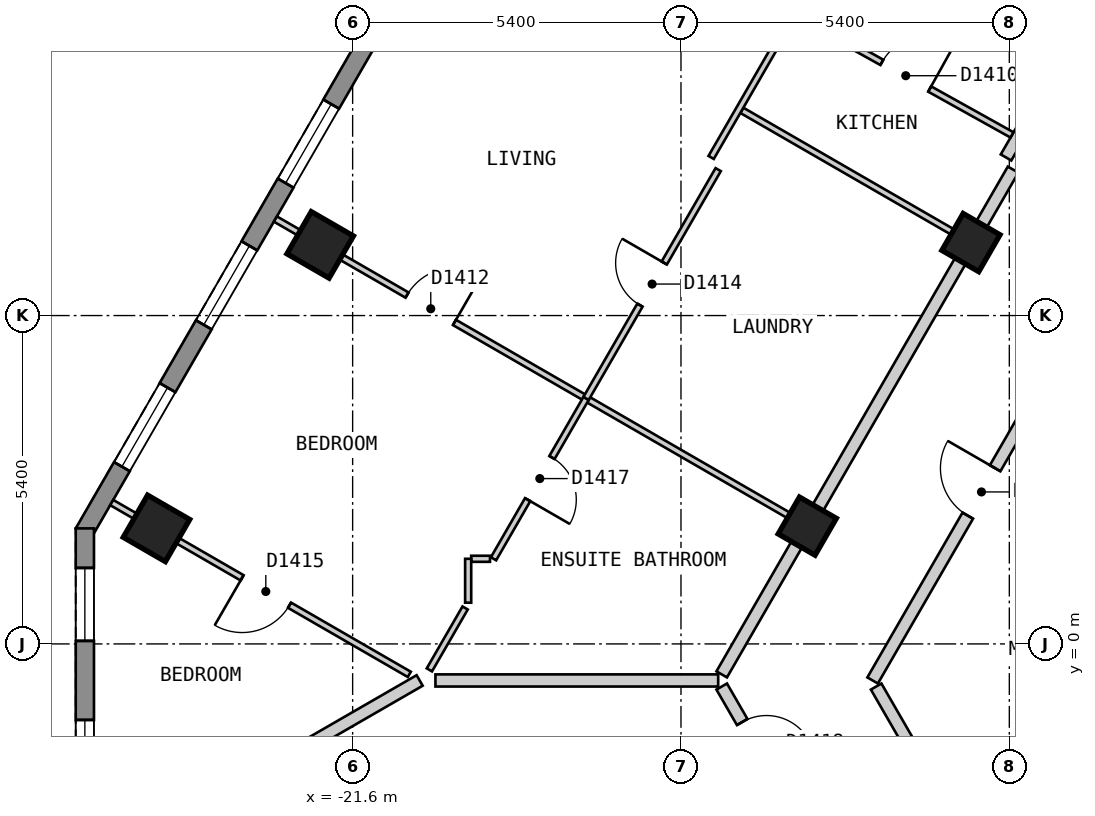
"""IFC4 building model, lengths in metres.
Left out: names, types, materials, properties, quantities, classifications, styles, units other than length and angle.
Written with IfcOpenShell. Run it as: python <this file> out.ifc"""

import sys

from ifc_helpers import new_model, si_unit, direction, frame, frame_2d, origin, origin_2d, place, context, subcontext, project, spatial, polyline, rectangle, outline, extrude, element, fill, save


model = new_model("IFC4")
c1 = context("Model", 3, precision=1e-05, world=origin(), true_north=direction((0.0, 1.0)))
c2 = subcontext(c1, "Body", "Model", "MODEL_VIEW")
j1 = project(units=[si_unit("LENGTHUNIT", "METRE"), si_unit("PLANEANGLEUNIT", "RADIAN")], contexts=[c1])
p1 = place(None, origin())
s1 = spatial("IfcSite", under=j1, at=p1, CompositionType="ELEMENT")
p2 = place(p1, origin())
s2 = spatial("IfcBuilding", under=s1, at=p2, CompositionType="ELEMENT")
p3 = place(p2, frame((0.0, 0.0, 166.2)))
s3 = spatial("IfcBuildingStorey", under=s2, at=p3, CompositionType="ELEMENT", Elevation=166.2)
for number, where, z_axis, x_axis in (
    (1, (-22.134, 6.562, 0.0), (0.0, 0.0, 1.0), (-0.5, -0.866, 0.0)),
    (2, (-24.826, 1.9, 0.0), (0.0, 0.0, 1.0), (-0.5, -0.866, 0.0)),
):
    element("IfcColumn", number, at=place(p3, frame(where, z_axis=z_axis, x_axis=x_axis)), inside=s3, PredefinedType="COLUMN", context=c2, shape_type="SweptSolid", body=[
        extrude(rectangle(XDim=0.8, YDim=0.8, at=origin_2d()), origin(), (0.0, 0.0, 1.0), 3.0),
    ])
for number, where, z_axis, x_axis in (
    (3, (-11.431, 6.6, 0.0), (0.0, 0.0, 1.0), (-0.5, -0.866, 0.0)),
    (4, (-14.123, 1.937, 0.0), (0.0, 0.0, 1.0), (-0.5, -0.866, 0.0)),
):
    element("IfcColumn", number, at=place(p3, frame(where, z_axis=z_axis, x_axis=x_axis)), inside=s3, PredefinedType="COLUMN", context=c2, shape_type="SweptSolid", body=[
        extrude(rectangle(XDim=0.7, YDim=0.7, at=origin_2d()), origin(), (0.0, 0.0, 1.0), 3.0),
    ])
p4 = place(p3, frame((-14.592, 21.625, 0.0), z_axis=(0.0, 0.0, 1.0), x_axis=(-0.500010537973, -0.866019319597, 0.0)))
e5 = element("IfcWall", 5, at=p4, inside=s3, PredefinedType="SOLIDWALL", context=c2, shape_type="SweptSolid", body=[
    extrude(outline(polyline([(0.0, -0.15), (22.863, -0.15), (22.783, 0.15), (0.08, 0.15), (0.0, -0.15)])), origin(), (0.0, 0.0, 1.0), 2.7),
])
p5 = place(p4, frame((1.259, 0.0, 0.15)))
e6 = element("IfcOpeningElement", 6, at=p5, cuts=e5, PredefinedType="OPENING", context=c2, shape_type="SweptSolid", body=[
    extrude(rectangle(XDim=1.5, YDim=2.1, at=frame_2d((0.75, 1.05))), frame((0.0, 0.16, 0.0), z_axis=(0.0, -1.0, 0.0), x_axis=(1.0, 0.0, 0.0)), (0.0, 0.0, 1.0), 0.32),
])
p6 = place(p4, frame((3.952, 0.0, 0.15)))
e7 = element("IfcOpeningElement", 7, at=p6, cuts=e5, PredefinedType="OPENING", context=c2, shape_type="SweptSolid", body=[
    extrude(rectangle(XDim=1.5, YDim=2.1, at=frame_2d((0.75, 1.05))), frame((0.0, 0.16, 0.0), z_axis=(0.0, -1.0, 0.0), x_axis=(1.0, 0.0, 0.0)), (0.0, 0.0, 1.0), 0.32),
])
p7 = place(p4, frame((6.644, 0.0, 0.15)))
e8 = element("IfcOpeningElement", 8, at=p7, cuts=e5, PredefinedType="OPENING", context=c2, shape_type="SweptSolid", body=[
    extrude(rectangle(XDim=1.5, YDim=2.1, at=frame_2d((0.75, 1.05))), frame((0.0, 0.16, 0.0), z_axis=(0.0, -1.0, 0.0), x_axis=(1.0, 0.0, 0.0)), (0.0, 0.0, 1.0), 0.32),
])
p8 = place(p4, frame((9.335, 0.0, 0.15)))
e9 = element("IfcOpeningElement", 9, at=p8, cuts=e5, PredefinedType="OPENING", context=c2, shape_type="SweptSolid", body=[
    extrude(rectangle(XDim=1.5, YDim=2.1, at=frame_2d((0.75, 1.05))), frame((0.0, 0.16, 0.0), z_axis=(0.0, -1.0, 0.0), x_axis=(1.0, 0.0, 0.0)), (0.0, 0.0, 1.0), 0.32),
])
p9 = place(p4, frame((12.028, 0.0, 0.15)))
e10 = element("IfcOpeningElement", 10, at=p9, cuts=e5, PredefinedType="OPENING", context=c2, shape_type="SweptSolid", body=[
    extrude(rectangle(XDim=1.5, YDim=2.1, at=frame_2d((0.75, 1.05))), frame((0.0, 0.16, 0.0), z_axis=(0.0, -1.0, 0.0), x_axis=(1.0, 0.0, 0.0)), (0.0, 0.0, 1.0), 0.32),
])
p10 = place(p4, frame((14.72, 0.0, 0.15)))
e11 = element("IfcOpeningElement", 11, at=p10, cuts=e5, PredefinedType="OPENING", context=c2, shape_type="SweptSolid", body=[
    extrude(rectangle(XDim=1.5, YDim=2.1, at=frame_2d((0.75, 1.05))), frame((0.0, 0.16, 0.0), z_axis=(0.0, -1.0, 0.0), x_axis=(1.0, 0.0, 0.0)), (0.0, 0.0, 1.0), 0.32),
])
p11 = place(p4, frame((17.411, 0.0, 0.15)))
e12 = element("IfcOpeningElement", 12, at=p11, cuts=e5, PredefinedType="OPENING", context=c2, shape_type="SweptSolid", body=[
    extrude(rectangle(XDim=1.5, YDim=2.1, at=frame_2d((0.75, 1.05))), frame((0.0, 0.16, 0.0), z_axis=(0.0, -1.0, 0.0), x_axis=(1.0, 0.0, 0.0)), (0.0, 0.0, 1.0), 0.32),
])
p12 = place(p4, frame((20.104, 0.0, 0.15)))
e13 = element("IfcOpeningElement", 13, at=p12, cuts=e5, PredefinedType="OPENING", context=c2, shape_type="SweptSolid", body=[
    extrude(rectangle(XDim=1.5, YDim=2.1, at=frame_2d((0.75, 1.05))), frame((0.0, 0.16, 0.0), z_axis=(0.0, -1.0, 0.0), x_axis=(1.0, 0.0, 0.0)), (0.0, 0.0, 1.0), 0.32),
])
p13 = place(p3, frame((-26.004, 1.9, 0.0), z_axis=(0.0, 0.0, 1.0), x_axis=(0.0, -1.0, 0.0)))
e14 = element("IfcWall", 14, at=p13, inside=s3, PredefinedType="SOLIDWALL", context=c2, shape_type="SweptSolid", body=[
    extrude(outline(polyline([(0.0, -0.15), (5.0, -0.15), (4.92, 0.15), (0.08, 0.15), (0.0, -0.15)])), origin(), (0.0, 0.0, 1.0), 2.7),
])
p14 = place(p13, frame((0.65, 0.0, 0.15)))
e15 = element("IfcOpeningElement", 15, at=p14, cuts=e14, PredefinedType="OPENING", context=c2, shape_type="SweptSolid", body=[
    extrude(rectangle(XDim=1.2, YDim=2.1, at=frame_2d((0.6, 1.05))), frame((0.0, 0.16, 0.0), z_axis=(0.0, -1.0, 0.0), x_axis=(1.0, 0.0, 0.0)), (0.0, 0.0, 1.0), 0.32),
])
p15 = place(p13, frame((3.15, 0.0, 0.15)))
e16 = element("IfcOpeningElement", 16, at=p15, cuts=e14, PredefinedType="OPENING", context=c2, shape_type="SweptSolid", body=[
    extrude(rectangle(XDim=1.2, YDim=2.1, at=frame_2d((0.6, 1.05))), frame((0.0, 0.16, 0.0), z_axis=(0.0, -1.0, 0.0), x_axis=(1.0, 0.0, 0.0)), (0.0, 0.0, 1.0), 0.32),
])
p16 = place(p3, frame((-12.99, -0.701, 0.0), z_axis=(0.0, 0.0, 1.0), x_axis=(0.499972710878, -0.866041158593, 0.0)))
e17 = element("IfcWall", 17, at=p16, inside=s3, PredefinedType="PARTITIONING", context=c2, shape_type="SweptSolid", body=[
    extrude(rectangle(XDim=2.308, YDim=0.2, at=frame_2d((1.154, 0.0))), origin(), (0.0, 0.0, 1.0), 2.7),
])
p17 = place(p3, frame((-15.53, -0.701, 0.0), z_axis=(0.0, 0.0, 1.0), x_axis=(0.499972710878, -0.866041158593, 0.0)))
e18 = element("IfcWall", 18, at=p17, inside=s3, PredefinedType="PARTITIONING", context=c2, shape_type="SweptSolid", body=[
    extrude(rectangle(XDim=2.308, YDim=0.2, at=frame_2d((1.154, 0.0))), origin(), (0.0, 0.0, 1.0), 2.7),
])
p18 = place(p17, frame((0.674, 0.0, 0.0)))
e19 = element("IfcOpeningElement", 19, at=p18, cuts=e18, PredefinedType="OPENING", context=c2, shape_type="SweptSolid", body=[
    extrude(rectangle(XDim=0.8, YDim=2.1, at=frame_2d((0.4, 1.05))), frame((0.0, 0.11, 0.0), z_axis=(0.0, -1.0, 0.0), x_axis=(1.0, 0.0, 0.0)), (0.0, 0.0, 1.0), 0.22),
])
p19 = place(p3, frame((-13.048, -0.601, 0.0), z_axis=(0.0, 0.0, 1.0), x_axis=(0.499982180423, 0.866035691677, 0.0)))
e20 = element("IfcWall", 20, at=p19, inside=s3, PredefinedType="PARTITIONING", context=c2, shape_type="SweptSolid", body=[
    extrude(rectangle(XDim=7.16, YDim=0.2, at=frame_2d((3.58, 0.0))), origin(), (0.0, 0.0, 1.0), 2.7),
])
p20 = place(p19, frame((3.13, 0.0, 0.0)))
e21 = element("IfcOpeningElement", 21, at=p20, cuts=e20, PredefinedType="OPENING", context=c2, shape_type="SweptSolid", body=[
    extrude(rectangle(XDim=0.9, YDim=2.1, at=frame_2d((0.45, 1.05))), frame((0.0, 0.11, 0.0), z_axis=(0.0, -1.0, 0.0), x_axis=(1.0, 0.0, 0.0)), (0.0, 0.0, 1.0), 0.22),
])
p21 = place(p3, frame((-15.53, -0.501, 0.0), z_axis=(0.0, 0.0, 1.0), x_axis=(0.499952498232, 0.866052827206, 0.0)))
e22 = element("IfcWall", 22, at=p21, inside=s3, PredefinedType="PARTITIONING", context=c2, shape_type="SweptSolid", body=[
    extrude(rectangle(XDim=9.585, YDim=0.2, at=frame_2d((4.792, 0.0))), origin(), (0.0, 0.0, 1.0), 2.7),
])
p22 = place(p3, frame((-10.854, 8.0, 0.0), z_axis=(0.0, 0.0, 1.0), x_axis=(0.499997637144, 0.866026767976, 0.0)))
e23 = element("IfcWall", 23, at=p22, inside=s3, PredefinedType="PARTITIONING", context=c2, shape_type="SweptSolid", body=[
    extrude(rectangle(XDim=10.854, YDim=0.2, at=frame_2d((5.427, 0.0))), origin(), (0.0, 0.0, 1.0), 2.7),
])
p23 = place(p22, frame((0.721, 0.0, 0.0)))
e24 = element("IfcOpeningElement", 24, at=p23, cuts=e23, PredefinedType="OPENING", context=c2, shape_type="SweptSolid", body=[
    extrude(rectangle(XDim=1.0, YDim=2.1, at=frame_2d((0.5, 1.05))), frame((0.0, 0.11, 0.0), z_axis=(0.0, -1.0, 0.0), x_axis=(1.0, 0.0, 0.0)), (0.0, 0.0, 1.0), 0.22),
])
p24 = place(p3, frame((-14.294, 10.342, 0.0), z_axis=(0.0, 0.0, 1.0), x_axis=(0.873582256032, -0.486676527013, 0.0)))
e25 = element("IfcWall", 25, at=p24, inside=s3, PredefinedType="PARTITIONING", context=c2, shape_type="SweptSolid", body=[
    extrude(rectangle(XDim=4.05, YDim=0.1, at=frame_2d((2.025, 0.0))), origin(), (0.0, 0.0, 1.0), 2.7),
])
p25 = place(p24, frame((1.6, 0.0, 0.0)))
e26 = element("IfcOpeningElement", 26, at=p25, cuts=e25, PredefinedType="OPENING", context=c2, shape_type="SweptSolid", body=[
    extrude(rectangle(XDim=0.9, YDim=2.1, at=frame_2d((0.45, 1.05))), frame((0.0, 0.06, 0.0), z_axis=(0.0, -1.0, 0.0), x_axis=(1.0, 0.0, 0.0)), (0.0, 0.0, 1.0), 0.12),
])
p26 = place(p3, frame((-22.87, 6.987, 0.0), z_axis=(0.0, 0.0, 1.0), x_axis=(0.866022959057, -0.500004234368, 0.0)))
e27 = element("IfcWall", 27, at=p26, inside=s3, PredefinedType="PARTITIONING", context=c2, shape_type="SweptSolid", body=[
    extrude(rectangle(XDim=10.0, YDim=0.1, at=frame_2d((5.0, 0.0))), origin(), (0.0, 0.0, 1.0), 2.7),
])
p27 = place(p26, frame((2.5, 0.0, 0.0)))
e28 = element("IfcOpeningElement", 28, at=p27, cuts=e27, PredefinedType="OPENING", context=c2, shape_type="SweptSolid", body=[
    extrude(rectangle(XDim=0.9, YDim=2.1, at=frame_2d((0.45, 1.05))), frame((0.0, 0.06, 0.0), z_axis=(0.0, -1.0, 0.0), x_axis=(1.0, 0.0, 0.0)), (0.0, 0.0, 1.0), 0.12),
])
p28 = place(p3, frame((-25.562, 2.325, 0.0), z_axis=(0.0, 0.0, 1.0), x_axis=(0.865998530728, -0.500046542611, 0.0)))
e29 = element("IfcWall", 29, at=p28, inside=s3, PredefinedType="PARTITIONING", context=c2, shape_type="SweptSolid", body=[
    extrude(rectangle(XDim=5.651, YDim=0.1, at=frame_2d((2.826, 0.0))), origin(), (0.0, 0.0, 1.0), 2.7),
])
p29 = place(p28, frame((2.476, 0.0, 0.0)))
e30 = element("IfcOpeningElement", 30, at=p29, cuts=e29, PredefinedType="OPENING", context=c2, shape_type="SweptSolid", body=[
    extrude(rectangle(XDim=0.9, YDim=2.1, at=frame_2d((0.45, 1.05))), frame((0.0, 0.06, 0.0), z_axis=(0.0, -1.0, 0.0), x_axis=(1.0, 0.0, 0.0)), (0.0, 0.0, 1.0), 0.12),
])
p30 = place(p3, frame((-15.199, 8.775, 0.0), z_axis=(0.0, 0.0, 1.0), x_axis=(0.866043063166, -0.499969411806, 0.0)))
e31 = element("IfcWall", 31, at=p30, inside=s3, PredefinedType="PARTITIONING", context=c2, shape_type="SweptSolid", body=[
    extrude(rectangle(XDim=4.25, YDim=0.1, at=frame_2d((2.125, 0.0))), origin(), (0.0, 0.0, 1.0), 2.7),
])
p31 = place(p3, frame((-19.65, 1.4, 0.0), z_axis=(0.0, 0.0, 1.0), x_axis=(1.0, 0.0, 0.0)))
e32 = element("IfcWall", 32, at=p31, inside=s3, PredefinedType="PARTITIONING", context=c2, shape_type="SweptSolid", body=[
    extrude(rectangle(XDim=0.309, YDim=0.1, at=frame_2d((0.154, 0.0))), origin(), (0.0, 0.0, 1.0), 2.7),
])
p32 = place(p3, frame((-20.338, -0.427, 0.0), z_axis=(0.0, 0.0, 1.0), x_axis=(0.500069990121, 0.865984991198, 0.0)))
e33 = element("IfcWall", 33, at=p32, inside=s3, PredefinedType="PARTITIONING", context=c2, shape_type="SweptSolid", body=[
    extrude(rectangle(XDim=1.176, YDim=0.1, at=frame_2d((0.588, 0.0))), origin(), (0.0, 0.0, 1.0), 2.7),
])
p33 = place(p3, frame((-19.283, 1.4, 0.0), z_axis=(0.0, 0.0, 1.0), x_axis=(0.499847391584, 0.866113494368, 0.0)))
e34 = element("IfcWall", 34, at=p33, inside=s3, PredefinedType="PARTITIONING", context=c2, shape_type="SweptSolid", body=[
    extrude(rectangle(XDim=3.045, YDim=0.1, at=frame_2d((1.522, 0.0))), origin(), (0.0, 0.0, 1.0), 2.7),
])
p34 = place(p33, frame((1.123, 0.0, 0.0)))
e35 = element("IfcOpeningElement", 35, at=p34, cuts=e34, PredefinedType="OPENING", context=c2, shape_type="SweptSolid", body=[
    extrude(rectangle(XDim=0.8, YDim=2.1, at=frame_2d((0.4, 1.05))), frame((0.0, 0.06, 0.0), z_axis=(0.0, -1.0, 0.0), x_axis=(1.0, 0.0, 0.0)), (0.0, 0.0, 1.0), 0.12),
])
p35 = place(p3, frame((-15.704, 8.0, 0.0), z_axis=(0.0, 0.0, 1.0), x_axis=(0.500005637941, 0.866022148693, 0.0)))
e36 = element("IfcWall", 36, at=p35, inside=s3, PredefinedType="PARTITIONING", context=c2, shape_type="SweptSolid", body=[
    extrude(rectangle(XDim=11.592, YDim=0.1, at=frame_2d((5.796, 0.0))), origin(), (0.0, 0.0, 1.0), 2.7),
])
p36 = place(p35, frame((3.132, 0.0, 0.0)))
e37 = element("IfcOpeningElement", 37, at=p36, cuts=e36, PredefinedType="OPENING", context=c2, shape_type="SweptSolid", body=[
    extrude(rectangle(XDim=0.9, YDim=2.1, at=frame_2d((0.45, 1.05))), frame((0.0, 0.06, 0.0), z_axis=(0.0, -1.0, 0.0), x_axis=(1.0, 0.0, 0.0)), (0.0, 0.0, 1.0), 0.12),
])
p37 = place(p35, frame((8.6, 0.0, 0.0)))
e38 = element("IfcOpeningElement", 38, at=p37, cuts=e36, PredefinedType="OPENING", context=c2, shape_type="SweptSolid", body=[
    extrude(rectangle(XDim=0.8, YDim=2.1, at=frame_2d((0.4, 1.05))), frame((0.0, 0.06, 0.0), z_axis=(0.0, -1.0, 0.0), x_axis=(1.0, 0.0, 0.0)), (0.0, 0.0, 1.0), 0.12),
])
p38 = place(p3, frame((-19.7, 0.678, 0.0), z_axis=(0.0, 0.0, 1.0), x_axis=(0.0, 1.0, 0.0)))
e39 = element("IfcWall", 39, at=p38, inside=s3, PredefinedType="PARTITIONING", context=c2, shape_type="SweptSolid", body=[
    extrude(rectangle(XDim=0.722, YDim=0.1, at=frame_2d((0.361, 0.0))), origin(), (0.0, 0.0, 1.0), 2.7),
])
p39 = place(p3, frame((-20.238, -0.601, 0.0), z_axis=(0.0, 0.0, 1.0), x_axis=(1.0, 0.0, 0.0)))
e40 = element("IfcWall", 40, at=p39, inside=s3, PredefinedType="PARTITIONING", context=c2, shape_type="SweptSolid", body=[
    extrude(rectangle(XDim=4.65, YDim=0.2, at=frame_2d((2.325, 0.0))), origin(), (0.0, 0.0, 1.0), 2.7),
])
p40 = place(p3, frame((-25.563, -3.524, 0.0), z_axis=(0.0, 0.0, 1.0), x_axis=(0.866128586522, 0.499821239653, 0.0)))
e41 = element("IfcWall", 41, at=p40, inside=s3, PredefinedType="PARTITIONING", context=c2, shape_type="SweptSolid", body=[
    extrude(rectangle(XDim=5.848, YDim=0.2, at=frame_2d((2.924, 0.0))), origin(), (0.0, 0.0, 1.0), 2.7),
])
p41 = place(p3, frame((-17.761, 4.037, 0.0), z_axis=(0.0, 0.0, 1.0), x_axis=(0.50009692756, 0.865969435399, 0.0)))
e42 = element("IfcWall", 42, at=p41, inside=s3, PredefinedType="PARTITIONING", context=c2, shape_type="SweptSolid", body=[
    extrude(rectangle(XDim=4.345, YDim=0.1, at=frame_2d((2.173, 0.0))), origin(), (0.0, 0.0, 1.0), 2.7),
])
p42 = place(p41, frame((1.772, 0.0, 0.0)))
e43 = element("IfcOpeningElement", 43, at=p42, cuts=e42, PredefinedType="OPENING", context=c2, shape_type="SweptSolid", body=[
    extrude(rectangle(XDim=0.8, YDim=2.1, at=frame_2d((0.4, 1.05))), frame((0.0, 0.06, 0.0), z_axis=(0.0, -1.0, 0.0), x_axis=(1.0, 0.0, 0.0)), (0.0, 0.0, 1.0), 0.12),
])
p43 = place(p10, origin())
e44 = element("IfcWindow", 44, at=p43, inside=s3, PartitioningType="SINGLE_PANEL", PredefinedType="WINDOW", context=c2, shape_type="SweptSolid", body=[
    extrude(rectangle(XDim=1.5, YDim=2.1, at=frame_2d((0.75, 1.05))), frame((0.0, 0.03, 0.0), z_axis=(0.0, -1.0, 0.0), x_axis=(1.0, 0.0, 0.0)), (0.0, 0.0, 1.0), 0.06),
])
fill(e11, e44)
p44 = place(p11, origin())
e45 = element("IfcWindow", 45, at=p44, inside=s3, PartitioningType="SINGLE_PANEL", PredefinedType="WINDOW", context=c2, shape_type="SweptSolid", body=[
    extrude(rectangle(XDim=1.5, YDim=2.1, at=frame_2d((0.75, 1.05))), frame((0.0, 0.03, 0.0), z_axis=(0.0, -1.0, 0.0), x_axis=(1.0, 0.0, 0.0)), (0.0, 0.0, 1.0), 0.06),
])
fill(e12, e45)
p45 = place(p12, origin())
e46 = element("IfcWindow", 46, at=p45, inside=s3, PartitioningType="SINGLE_PANEL", PredefinedType="WINDOW", context=c2, shape_type="SweptSolid", body=[
    extrude(rectangle(XDim=1.5, YDim=2.1, at=frame_2d((0.75, 1.05))), frame((0.0, 0.03, 0.0), z_axis=(0.0, -1.0, 0.0), x_axis=(1.0, 0.0, 0.0)), (0.0, 0.0, 1.0), 0.06),
])
fill(e13, e46)
p46 = place(p14, origin())
e47 = element("IfcWindow", 47, at=p46, inside=s3, PartitioningType="SINGLE_PANEL", PredefinedType="WINDOW", context=c2, shape_type="SweptSolid", body=[
    extrude(rectangle(XDim=1.2, YDim=2.1, at=frame_2d((0.6, 1.05))), frame((0.0, 0.03, 0.0), z_axis=(0.0, -1.0, 0.0), x_axis=(1.0, 0.0, 0.0)), (0.0, 0.0, 1.0), 0.06),
])
fill(e15, e47)
p47 = place(p15, origin())
e48 = element("IfcWindow", 48, at=p47, inside=s3, PartitioningType="SINGLE_PANEL", PredefinedType="WINDOW", context=c2, shape_type="SweptSolid", body=[
    extrude(rectangle(XDim=1.2, YDim=2.1, at=frame_2d((0.6, 1.05))), frame((0.0, 0.03, 0.0), z_axis=(0.0, -1.0, 0.0), x_axis=(1.0, 0.0, 0.0)), (0.0, 0.0, 1.0), 0.06),
])
fill(e16, e48)
p48 = place(p25, origin())
e49 = element("IfcDoor", 49, at=p48, inside=s3, OperationType="SINGLE_SWING_RIGHT", PredefinedType="DOOR", context=c2, shape_type="SweptSolid", body=[
    extrude(rectangle(XDim=0.9, YDim=2.1, at=frame_2d((0.45, 1.05))), frame((0.0, 0.025, 0.0), z_axis=(0.0, -1.0, 0.0), x_axis=(1.0, 0.0, 0.0)), (0.0, 0.0, 1.0), 0.05),
])
fill(e26, e49)
p49 = place(p27, origin())
e50 = element("IfcDoor", 50, at=p49, inside=s3, OperationType="SINGLE_SWING_RIGHT", PredefinedType="DOOR", context=c2, shape_type="SweptSolid", body=[
    extrude(rectangle(XDim=0.9, YDim=2.1, at=frame_2d((0.45, 1.05))), frame((0.0, 0.025, 0.0), z_axis=(0.0, -1.0, 0.0), x_axis=(1.0, 0.0, 0.0)), (0.0, 0.0, 1.0), 0.05),
])
fill(e28, e50)
p50 = place(p42, origin())
e51 = element("IfcDoor", 51, at=p50, inside=s3, OperationType="SINGLE_SWING_RIGHT", PredefinedType="DOOR", context=c2, shape_type="SweptSolid", body=[
    extrude(rectangle(XDim=0.8, YDim=2.1, at=frame_2d((0.4, 1.05))), frame((0.0, 0.025, 0.0), z_axis=(0.0, -1.0, 0.0), x_axis=(1.0, 0.0, 0.0)), (0.0, 0.0, 1.0), 0.05),
])
fill(e43, e51)
p51 = place(p29, origin())
e52 = element("IfcDoor", 52, at=p51, inside=s3, OperationType="SINGLE_SWING_LEFT", PredefinedType="DOOR", context=c2, shape_type="SweptSolid", body=[
    extrude(rectangle(XDim=0.9, YDim=2.1, at=frame_2d((0.45, 1.05))), frame((0.0, 0.025, 0.0), z_axis=(0.0, -1.0, 0.0), x_axis=(1.0, 0.0, 0.0)), (0.0, 0.0, 1.0), 0.05),
])
fill(e30, e52)
p52 = place(p34, origin())
e53 = element("IfcDoor", 53, at=p52, inside=s3, OperationType="SINGLE_SWING_LEFT", PredefinedType="DOOR", context=c2, shape_type="SweptSolid", body=[
    extrude(rectangle(XDim=0.8, YDim=2.1, at=frame_2d((0.4, 1.05))), frame((0.0, 0.025, 0.0), z_axis=(0.0, -1.0, 0.0), x_axis=(1.0, 0.0, 0.0)), (0.0, 0.0, 1.0), 0.05),
])
fill(e35, e53)
p53 = place(p18, origin())
e54 = element("IfcDoor", 54, at=p53, inside=s3, OperationType="SINGLE_SWING_RIGHT", PredefinedType="DOOR", context=c2, shape_type="SweptSolid", body=[
    extrude(rectangle(XDim=0.8, YDim=2.1, at=frame_2d((0.4, 1.05))), frame((0.0, 0.025, 0.0), z_axis=(0.0, -1.0, 0.0), x_axis=(1.0, 0.0, 0.0)), (0.0, 0.0, 1.0), 0.05),
])
fill(e19, e54)
p54 = place(p20, origin())
e55 = element("IfcDoor", 55, at=p54, inside=s3, OperationType="SINGLE_SWING_RIGHT", PredefinedType="DOOR", context=c2, shape_type="SweptSolid", body=[
    extrude(rectangle(XDim=0.9, YDim=2.1, at=frame_2d((0.45, 1.05))), frame((0.0, 0.025, 0.0), z_axis=(0.0, -1.0, 0.0), x_axis=(1.0, 0.0, 0.0)), (0.0, 0.0, 1.0), 0.05),
])
fill(e21, e55)
save(model, sys.argv[1])
